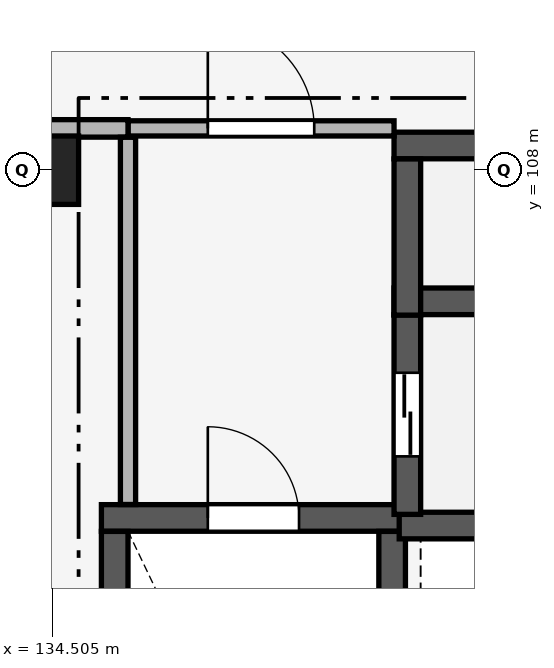
"""IFC4 building model, lengths in metres.
Left out: names, types, materials, properties, quantities, classifications, styles, units other than length and angle.
Written with IfcOpenShell. Run it as: python <this file> out.ifc"""

import sys

from ifc_helpers import new_model, si_unit, direction, frame, frame_2d, origin, origin_2d, place, context, subcontext, project, spatial, rectangle, extrude, element, fill, save


model = new_model("IFC4")
c1 = context("Model", 3, precision=1e-05, world=origin(), true_north=direction((0.0, 1.0)))
c2 = subcontext(c1, "Body", "Model", "MODEL_VIEW")
j1 = project(units=[si_unit("LENGTHUNIT", "METRE"), si_unit("PLANEANGLEUNIT", "RADIAN")], contexts=[c1])
p1 = place(None, origin())
s1 = spatial("IfcSite", under=j1, at=p1, CompositionType="ELEMENT")
p2 = place(p1, origin())
s2 = spatial("IfcBuilding", under=s1, at=p2, CompositionType="ELEMENT")
p3 = place(p2, frame((0.0, 0.0, 5.1)))
s3 = spatial("IfcBuildingStorey", under=s2, at=p3, CompositionType="ELEMENT", Elevation=5.1)
p4 = place(p3, frame((134.4, 108.0, 0.0), z_axis=(0.0, 0.0, 1.0), x_axis=(1.0, 0.0, 0.0)))
e1 = element("IfcColumn", 1, at=p4, inside=s3, PredefinedType="COLUMN", context=c2, shape_type="SweptSolid", body=[
    extrude(rectangle(XDim=0.9, YDim=0.9, at=origin_2d()), origin(), (0.0, 0.0, 1.0), 5.1),
])
p5 = place(p3, frame((135.15, 103.425, 0.0), z_axis=(0.0, 0.0, 1.0), x_axis=(1.0, 0.0, 0.0)))
e2 = element("IfcWall", 2, at=p5, inside=s3, PredefinedType="SHEAR", context=c2, shape_type="SweptSolid", body=[
    extrude(rectangle(XDim=4.0, YDim=0.35, at=frame_2d((2.0, 0.0))), origin(), (0.0, 0.0, 1.0), 4.82),
])
p6 = place(p5, frame((1.4, 0.0, 0.0)))
e3 = element("IfcOpeningElement", 3, at=p6, cuts=e2, PredefinedType="OPENING", context=c2, shape_type="SweptSolid", body=[
    extrude(rectangle(XDim=1.2, YDim=2.2, at=frame_2d((0.6, 1.1))), frame((0.0, 0.19, 0.0), z_axis=(0.0, -1.0, 0.0), x_axis=(1.0, 0.0, 0.0)), (0.0, 0.0, 1.0), 0.38),
])
for number, where, z_axis, x_axis in (
    (4, (135.325, 96.352, 0.0), (0.0, 0.0, 1.0), (0.0, 1.0, 0.0)),
    (5, (138.975, 96.352, 0.0), (0.0, 0.0, 1.0), (0.0, 1.0, 0.0)),
):
    element("IfcWall", number, at=place(p3, frame(where, z_axis=z_axis, x_axis=x_axis)), inside=s3, PredefinedType="SHEAR", context=c2, shape_type="SweptSolid", body=[
        extrude(rectangle(XDim=6.896, YDim=0.35, at=frame_2d((3.448, 0.0))), origin(), (0.0, 0.0, 1.0), 4.82),
    ])
p7 = place(p3, frame((139.068, 103.325, 0.0), z_axis=(0.0, 0.0, 1.0), x_axis=(1.0, 0.0, 0.0)))
e6 = element("IfcWall", 6, at=p7, inside=s3, PredefinedType="SHEAR", context=c2, shape_type="SweptSolid", body=[
    extrude(rectangle(XDim=3.032, YDim=0.35, at=frame_2d((1.516, 0.0))), origin(), (0.0, 0.0, 1.0), 4.82),
])
p8 = place(p3, frame((139.0, 106.275, 0.0), z_axis=(0.0, 0.0, 1.0), x_axis=(1.0, 0.0, 0.0)))
e7 = element("IfcWall", 7, at=p8, inside=s3, PredefinedType="SHEAR", context=c2, shape_type="SweptSolid", body=[
    extrude(rectangle(XDim=3.1, YDim=0.35, at=frame_2d((1.55, 0.0))), origin(), (0.0, 0.0, 1.0), 4.82),
])
p9 = place(p3, frame((139.175, 103.472, 0.0), z_axis=(0.0, 0.0, 1.0), x_axis=(0.0, 1.0, 0.0)))
e8 = element("IfcWall", 8, at=p9, inside=s3, PredefinedType="SHEAR", context=c2, shape_type="SweptSolid", body=[
    extrude(rectangle(XDim=2.626, YDim=0.35, at=frame_2d((1.313, 0.0))), origin(), (0.0, 0.0, 1.0), 4.82),
])
p10 = place(p9, frame((0.763, 0.0, 0.0)))
e9 = element("IfcOpeningElement", 9, at=p10, cuts=e8, PredefinedType="OPENING", context=c2, shape_type="SweptSolid", body=[
    extrude(rectangle(XDim=1.1, YDim=2.15, at=frame_2d((0.55, 1.075))), frame((0.0, 0.19, 0.0), z_axis=(0.0, -1.0, 0.0), x_axis=(1.0, 0.0, 0.0)), (0.0, 0.0, 1.0), 0.38),
])
p11 = place(p3, frame((139.0, 108.325, 0.0), z_axis=(0.0, 0.0, 1.0), x_axis=(1.0, 0.0, 0.0)))
e10 = element("IfcWall", 10, at=p11, inside=s3, PredefinedType="SHEAR", context=c2, shape_type="SweptSolid", body=[
    extrude(rectangle(XDim=3.355, YDim=0.35, at=frame_2d((1.677, 0.0))), origin(), (0.0, 0.0, 1.0), 4.82),
])
p12 = place(p11, frame((1.127, 0.0, 0.0)))
e11 = element("IfcOpeningElement", 11, at=p12, cuts=e10, PredefinedType="OPENING", context=c2, shape_type="SweptSolid", body=[
    extrude(rectangle(XDim=1.1, YDim=2.15, at=frame_2d((0.55, 1.075))), frame((0.0, 0.19, 0.0), z_axis=(0.0, -1.0, 0.0), x_axis=(1.0, 0.0, 0.0)), (0.0, 0.0, 1.0), 0.38),
])
p13 = place(p3, frame((139.175, 106.093, 0.0), z_axis=(0.0, 0.0, 1.0), x_axis=(0.0, 1.0, 0.0)))
e12 = element("IfcWall", 12, at=p13, inside=s3, PredefinedType="SHEAR", context=c2, shape_type="SweptSolid", body=[
    extrude(rectangle(XDim=2.055, YDim=0.35, at=frame_2d((1.027, 0.0))), origin(), (0.0, 0.0, 1.0), 4.82),
])
p14 = place(p3, frame((135.5, 108.55, 0.0), z_axis=(0.0, 0.0, 1.0), x_axis=(1.0, 0.0, 0.0)))
e13 = element("IfcWall", 13, at=p14, inside=s3, PredefinedType="PARTITIONING", context=c2, shape_type="SweptSolid", body=[
    extrude(rectangle(XDim=3.5, YDim=0.2, at=frame_2d((1.75, 0.0))), origin(), (0.0, 0.0, 1.0), 4.82),
])
p15 = place(p14, frame((1.05, 0.0, 0.0)))
e14 = element("IfcOpeningElement", 14, at=p15, cuts=e13, PredefinedType="OPENING", context=c2, shape_type="SweptSolid", body=[
    extrude(rectangle(XDim=1.4, YDim=2.2, at=frame_2d((0.7, 1.1))), frame((0.0, 0.115, 0.0), z_axis=(0.0, -1.0, 0.0), x_axis=(1.0, 0.0, 0.0)), (0.0, 0.0, 1.0), 0.23),
])
p16 = place(p3, frame((134.23, 108.55, 0.0), z_axis=(0.0, 0.0, 1.0), x_axis=(1.0, 0.0, 0.0)))
e15 = element("IfcWall", 15, at=p16, inside=s3, PredefinedType="SOLIDWALL", context=c2, shape_type="SweptSolid", body=[
    extrude(rectangle(XDim=1.27, YDim=0.23, at=frame_2d((0.635, 0.0))), origin(), (0.0, 0.0, 1.0), 4.27),
])
p17 = place(p3, frame((135.5, 103.602, 0.0), z_axis=(0.0, 0.0, 1.0), x_axis=(0.0, 1.0, 0.0)))
e16 = element("IfcWall", 16, at=p17, inside=s3, PredefinedType="PARTITIONING", context=c2, shape_type="SweptSolid", body=[
    extrude(rectangle(XDim=4.831, YDim=0.2, at=frame_2d((2.416, 0.0))), origin(), (0.0, 0.0, 1.0), 4.82),
])
p18 = place(p6, origin())
e17 = element("IfcDoor", 17, at=p18, inside=s3, OperationType="SINGLE_SWING_LEFT", PredefinedType="DOOR", context=c2, shape_type="SweptSolid", body=[
    extrude(rectangle(XDim=1.2, YDim=2.2, at=frame_2d((0.6, 1.1))), frame((0.0, 0.025, 0.0), z_axis=(0.0, -1.0, 0.0), x_axis=(1.0, 0.0, 0.0)), (0.0, 0.0, 1.0), 0.05),
])
fill(e3, e17)
p19 = place(p10, origin())
e18 = element("IfcDoor", 18, at=p19, inside=s3, OperationType="DOUBLE_DOOR_SLIDING", PredefinedType="DOOR", context=c2, shape_type="SweptSolid", body=[
    extrude(rectangle(XDim=1.1, YDim=2.15, at=frame_2d((0.55, 1.075))), frame((0.0, 0.025, 0.0), z_axis=(0.0, -1.0, 0.0), x_axis=(1.0, 0.0, 0.0)), (0.0, 0.0, 1.0), 0.05),
])
fill(e9, e18)
p20 = place(p15, origin())
e19 = element("IfcDoor", 19, at=p20, inside=s3, OperationType="SINGLE_SWING_LEFT", PredefinedType="DOOR", context=c2, shape_type="SweptSolid", body=[
    extrude(rectangle(XDim=1.4, YDim=2.2, at=frame_2d((0.7, 1.1))), frame((0.0, 0.025, 0.0), z_axis=(0.0, -1.0, 0.0), x_axis=(1.0, 0.0, 0.0)), (0.0, 0.0, 1.0), 0.05),
])
fill(e14, e19)
save(model, sys.argv[1])
